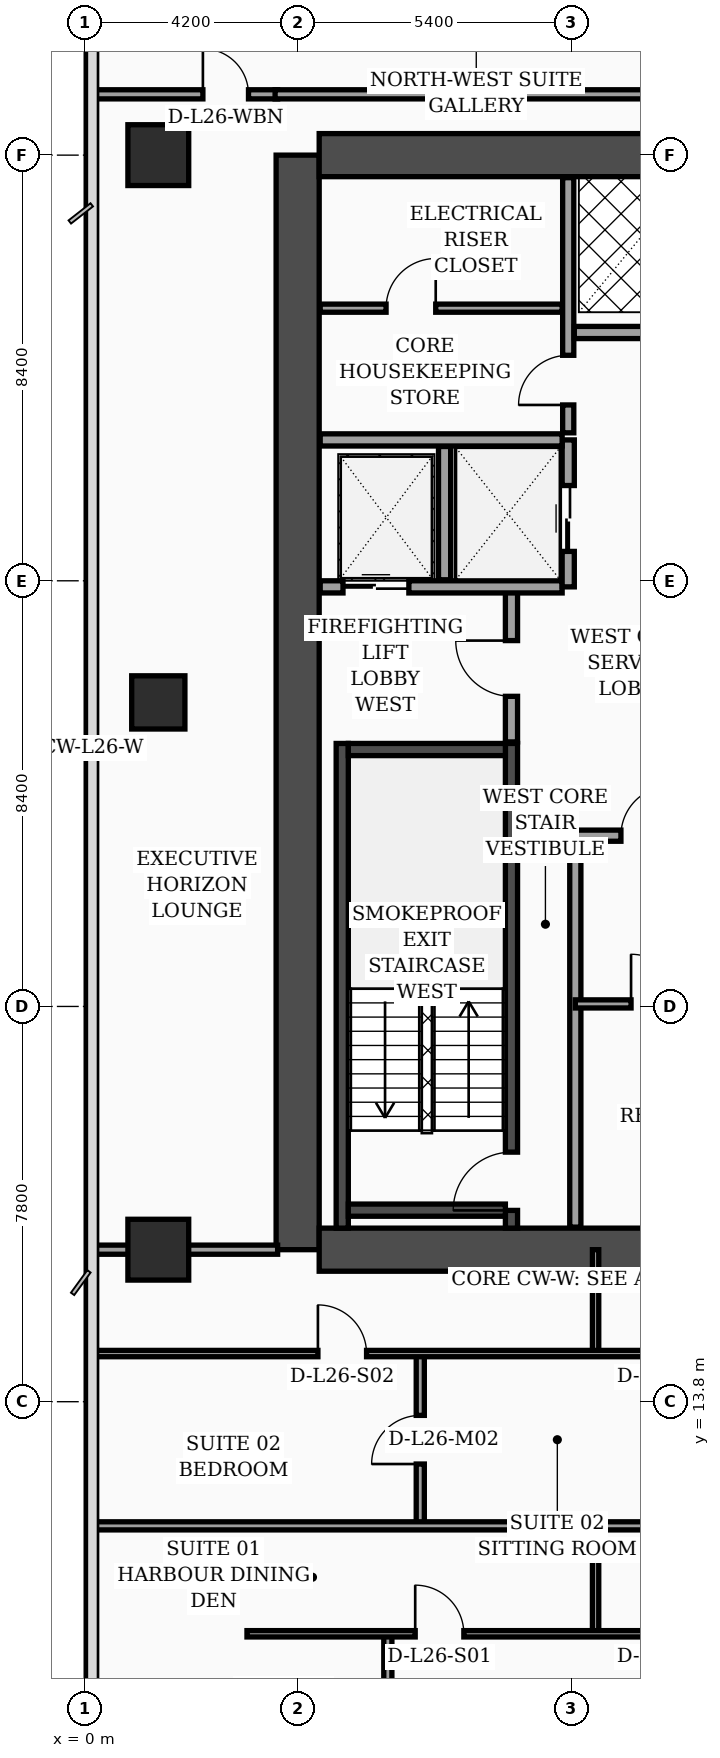
"""IFC4 building model, lengths in metres.
Left out: names, types, materials, properties, quantities, classifications, styles, units other than length and angle.
Written with IfcOpenShell. Run it as: python <this file> out.ifc"""

import sys

from ifc_helpers import new_model, si_unit, direction, frame, frame_2d, origin, origin_2d, place, context, subcontext, project, spatial, rectangle, extrude, element, fill, save


model = new_model("IFC4")
c1 = context("Model", 3, precision=1e-05, world=origin(), true_north=direction((0.0, 1.0)))
c2 = subcontext(c1, "Body", "Model", "MODEL_VIEW")
j1 = project(units=[si_unit("LENGTHUNIT", "METRE"), si_unit("PLANEANGLEUNIT", "RADIAN")], contexts=[c1])
p1 = place(None, origin())
s1 = spatial("IfcSite", under=j1, at=p1, CompositionType="ELEMENT")
p2 = place(p1, origin())
s2 = spatial("IfcBuilding", under=s1, at=p2, CompositionType="ELEMENT")
p3 = place(p2, frame((0.0, 0.0, 108.8)))
s3 = spatial("IfcBuildingStorey", under=s2, at=p3, CompositionType="ELEMENT", Elevation=108.8)
p4 = place(p3, frame((4.2, 16.8, 0.0), z_axis=(0.0, 0.0, 1.0), x_axis=(0.0, 1.0, 0.0)))
e1 = element("IfcWall", 1, at=p4, inside=s3, PredefinedType="SHEAR", context=c2, shape_type="SweptSolid", body=[
    extrude(rectangle(XDim=21.6, YDim=0.85, at=frame_2d((10.8, 0.0))), origin(), (0.0, 0.0, 1.0), 3.56),
])
for number, where, z_axis, x_axis in (
    (2, (4.625, 38.4, 0.0), (0.0, 0.0, 1.0), (1.0, 0.0, 0.0)),
    (3, (4.625, 16.8, 0.0), (0.0, 0.0, 1.0), (1.0, 0.0, 0.0)),
):
    element("IfcWall", number, at=place(p3, frame(where, z_axis=z_axis, x_axis=x_axis)), inside=s3, PredefinedType="SHEAR", context=c2, shape_type="SweptSolid", body=[
        extrude(rectangle(XDim=9.95, YDim=0.85, at=frame_2d((4.975, 0.0))), origin(), (0.0, 0.0, 1.0), 3.56),
    ])
p5 = place(p3, frame((5.08, 17.225, 0.0), z_axis=(0.0, 0.0, 1.0), x_axis=(0.0, 1.0, 0.0)))
e4 = element("IfcWall", 4, at=p5, inside=s3, PredefinedType="SOLIDWALL", context=c2, shape_type="SweptSolid", body=[
    extrude(rectangle(XDim=9.565, YDim=0.24, at=frame_2d((4.782, 0.0))), origin(), (0.0, 0.0, 1.0), 3.56),
])
p6 = place(p3, frame((8.42, 17.225, 0.0), z_axis=(0.0, 0.0, 1.0), x_axis=(0.0, 1.0, 0.0)))
e5 = element("IfcWall", 5, at=p6, inside=s3, PredefinedType="SOLIDWALL", context=c2, shape_type="SweptSolid", body=[
    extrude(rectangle(XDim=9.565, YDim=0.24, at=frame_2d((4.782, 0.0))), origin(), (0.0, 0.0, 1.0), 3.56),
])
p7 = place(p6, frame((0.35, 0.0, 0.0)))
e6 = element("IfcOpeningElement", 6, at=p7, cuts=e5, PredefinedType="OPENING", context=c2, shape_type="SweptSolid", body=[
    extrude(rectangle(XDim=1.15, YDim=2.2, at=frame_2d((0.575, 1.1))), frame((0.0, 0.13, 0.0), z_axis=(0.0, -1.0, 0.0), x_axis=(1.0, 0.0, 0.0)), (0.0, 0.0, 1.0), 0.26),
])
for number, where, z_axis, x_axis in (
    (7, (5.2, 17.58, 0.0), (0.0, 0.0, 1.0), (1.0, 0.0, 0.0)),
    (8, (5.2, 26.67, 0.0), (0.0, 0.0, 1.0), (1.0, 0.0, 0.0)),
):
    element("IfcWall", number, at=place(p3, frame(where, z_axis=z_axis, x_axis=x_axis)), inside=s3, PredefinedType="SOLIDWALL", context=c2, shape_type="SweptSolid", body=[
        extrude(rectangle(XDim=3.1, YDim=0.24, at=frame_2d((1.55, 0.0))), origin(), (0.0, 0.0, 1.0), 3.56),
    ])
p8 = place(p3, frame((1.45, 16.8, 0.0), z_axis=(0.0, 0.0, 1.0), x_axis=(1.0, 0.0, 0.0)))
e9 = element("IfcColumn", 9, at=p8, inside=s3, PredefinedType="COLUMN", context=c2, shape_type="SweptSolid", body=[
    extrude(rectangle(XDim=1.2, YDim=1.2, at=origin_2d()), origin(), (0.0, 0.0, 1.0), 3.56),
])
p9 = place(p3, frame((1.45, 27.6, 0.0), z_axis=(0.0, 0.0, 1.0), x_axis=(1.0, 0.0, 0.0)))
e10 = element("IfcColumn", 10, at=p9, inside=s3, PredefinedType="COLUMN", context=c2, shape_type="SweptSolid", body=[
    extrude(rectangle(XDim=1.05, YDim=1.05, at=origin_2d()), origin(), (0.0, 0.0, 1.0), 3.56),
])
p10 = place(p3, frame((1.45, 38.4, 0.0), z_axis=(0.0, 0.0, 1.0), x_axis=(1.0, 0.0, 0.0)))
e11 = element("IfcColumn", 11, at=p10, inside=s3, PredefinedType="COLUMN", context=c2, shape_type="SweptSolid", body=[
    extrude(rectangle(XDim=1.2, YDim=1.2, at=origin_2d()), origin(), (0.0, 0.0, 1.0), 3.56),
])
p11 = place(p3, frame((8.42, 26.82, 0.0), z_axis=(0.0, 0.0, 1.0), x_axis=(0.0, 1.0, 0.0)))
e12 = element("IfcWall", 12, at=p11, inside=s3, PredefinedType="SOLIDWALL", context=c2, shape_type="SweptSolid", body=[
    extrude(rectangle(XDim=3.0, YDim=0.24, at=frame_2d((1.5, 0.0))), origin(), (0.0, 0.0, 1.0), 3.56),
])
p12 = place(p11, frame((0.9, 0.0, 0.0)))
e13 = element("IfcOpeningElement", 13, at=p12, cuts=e12, PredefinedType="OPENING", context=c2, shape_type="SweptSolid", body=[
    extrude(rectangle(XDim=1.1, YDim=2.2, at=frame_2d((0.55, 1.1))), frame((0.0, 0.13, 0.0), z_axis=(0.0, -1.0, 0.0), x_axis=(1.0, 0.0, 0.0)), (0.0, 0.0, 1.0), 0.26),
])
p13 = place(p3, frame((4.645, 29.88, 0.0), z_axis=(0.0, 0.0, 1.0), x_axis=(1.0, 0.0, 0.0)))
e14 = element("IfcWall", 14, at=p13, inside=s3, PredefinedType="SOLIDWALL", context=c2, shape_type="SweptSolid", body=[
    extrude(rectangle(XDim=4.775, YDim=0.24, at=frame_2d((2.387, 0.0))), origin(), (0.0, 0.0, 1.0), 3.56),
])
p14 = place(p13, frame((0.45, 0.0, 0.0)))
e15 = element("IfcOpeningElement", 15, at=p14, cuts=e14, PredefinedType="OPENING", context=c2, shape_type="SweptSolid", body=[
    extrude(rectangle(XDim=1.3, YDim=2.35, at=frame_2d((0.65, 1.175))), frame((0.0, 0.13, 0.0), z_axis=(0.0, -1.0, 0.0), x_axis=(1.0, 0.0, 0.0)), (0.0, 0.0, 1.0), 0.26),
])
p15 = place(p3, frame((7.1, 30.02, 0.0), z_axis=(0.0, 0.0, 1.0), x_axis=(0.0, 1.0, 0.0)))
e16 = element("IfcWall", 16, at=p15, inside=s3, PredefinedType="SOLIDWALL", context=c2, shape_type="SweptSolid", body=[
    extrude(rectangle(XDim=2.63, YDim=0.24, at=frame_2d((1.315, 0.0))), origin(), (0.0, 0.0, 1.0), 3.56),
])
p16 = place(p3, frame((9.54, 29.88, 0.0), z_axis=(0.0, 0.0, 1.0), x_axis=(0.0, 1.0, 0.0)))
e17 = element("IfcWall", 17, at=p16, inside=s3, PredefinedType="SOLIDWALL", context=c2, shape_type="SweptSolid", body=[
    extrude(rectangle(XDim=2.9, YDim=0.24, at=frame_2d((1.45, 0.0))), origin(), (0.0, 0.0, 1.0), 3.56),
])
p17 = place(p16, frame((0.7, 0.0, 0.0)))
e18 = element("IfcOpeningElement", 18, at=p17, cuts=e17, PredefinedType="OPENING", context=c2, shape_type="SweptSolid", body=[
    extrude(rectangle(XDim=1.3, YDim=2.35, at=frame_2d((0.65, 1.175))), frame((0.0, 0.13, 0.0), z_axis=(0.0, -1.0, 0.0), x_axis=(1.0, 0.0, 0.0)), (0.0, 0.0, 1.0), 0.26),
])
p18 = place(p3, frame((4.645, 32.78, 0.0), z_axis=(0.0, 0.0, 1.0), x_axis=(1.0, 0.0, 0.0)))
e19 = element("IfcWall", 19, at=p18, inside=s3, PredefinedType="SOLIDWALL", context=c2, shape_type="SweptSolid", body=[
    extrude(rectangle(XDim=4.775, YDim=0.24, at=frame_2d((2.387, 0.0))), origin(), (0.0, 0.0, 1.0), 3.19),
])
p19 = place(p3, frame((9.68, 17.245, 0.0), z_axis=(0.0, 0.0, 1.0), x_axis=(0.0, 1.0, 0.0)))
e20 = element("IfcWall", 20, at=p19, inside=s3, PredefinedType="SOLIDWALL", context=c2, shape_type="SweptSolid", body=[
    extrude(rectangle(XDim=7.755, YDim=0.22, at=frame_2d((3.877, 0.0))), origin(), (0.0, 0.0, 1.0), 3.56),
])
p20 = place(p3, frame((4.645, 35.38, 0.0), z_axis=(0.0, 0.0, 1.0), x_axis=(1.0, 0.0, 0.0)))
e21 = element("IfcWall", 21, at=p20, inside=s3, PredefinedType="PARTITIONING", context=c2, shape_type="SweptSolid", body=[
    extrude(rectangle(XDim=4.775, YDim=0.16, at=frame_2d((2.387, 0.0))), origin(), (0.0, 0.0, 1.0), 3.56),
])
p21 = place(p20, frame((1.3, 0.0, 0.0)))
e22 = element("IfcOpeningElement", 22, at=p21, cuts=e21, PredefinedType="OPENING", context=c2, shape_type="SweptSolid", body=[
    extrude(rectangle(XDim=0.98, YDim=2.15, at=frame_2d((0.49, 1.075))), frame((0.0, 0.09, 0.0), z_axis=(0.0, -1.0, 0.0), x_axis=(1.0, 0.0, 0.0)), (0.0, 0.0, 1.0), 0.18),
])
p22 = place(p3, frame((9.54, 32.92, 0.0), z_axis=(0.0, 0.0, 1.0), x_axis=(0.0, 1.0, 0.0)))
e23 = element("IfcWall", 23, at=p22, inside=s3, PredefinedType="SOLIDWALL", context=c2, shape_type="SweptSolid", body=[
    extrude(rectangle(XDim=5.035, YDim=0.22, at=frame_2d((2.518, 0.0))), origin(), (0.0, 0.0, 1.0), 3.56),
])
p23 = place(p22, frame((0.55, 0.0, 0.0)))
e24 = element("IfcOpeningElement", 24, at=p23, cuts=e23, PredefinedType="OPENING", context=c2, shape_type="SweptSolid", body=[
    extrude(rectangle(XDim=0.98, YDim=2.15, at=frame_2d((0.49, 1.075))), frame((0.0, 0.12, 0.0), z_axis=(0.0, -1.0, 0.0), x_axis=(1.0, 0.0, 0.0)), (0.0, 0.0, 1.0), 0.24),
])
p24 = place(p3, frame((9.68, 21.65, 0.0), z_axis=(0.0, 0.0, 1.0), x_axis=(1.0, 0.0, 0.0)))
e25 = element("IfcWall", 25, at=p24, inside=s3, PredefinedType="PARTITIONING", context=c2, shape_type="SweptSolid", body=[
    extrude(rectangle(XDim=4.875, YDim=0.16, at=frame_2d((2.438, 0.0))), origin(), (0.0, 0.0, 1.0), 3.09),
])
p25 = place(p24, frame((1.1, 0.0, 0.0)))
e26 = element("IfcOpeningElement", 26, at=p25, cuts=e25, PredefinedType="OPENING", context=c2, shape_type="SweptSolid", body=[
    extrude(rectangle(XDim=0.98, YDim=2.15, at=frame_2d((0.49, 1.075))), frame((0.0, 0.09, 0.0), z_axis=(0.0, -1.0, 0.0), x_axis=(1.0, 0.0, 0.0)), (0.0, 0.0, 1.0), 0.18),
])
p26 = place(p3, frame((9.68, 24.97, 0.0), z_axis=(0.0, 0.0, 1.0), x_axis=(1.0, 0.0, 0.0)))
e27 = element("IfcWall", 27, at=p26, inside=s3, PredefinedType="SOLIDWALL", context=c2, shape_type="SweptSolid", body=[
    extrude(rectangle(XDim=4.875, YDim=0.22, at=frame_2d((2.438, 0.0))), origin(), (0.0, 0.0, 1.0), 2.84),
])
p27 = place(p26, frame((0.9, 0.0, 0.0)))
e28 = element("IfcOpeningElement", 28, at=p27, cuts=e27, PredefinedType="OPENING", context=c2, shape_type="SweptSolid", body=[
    extrude(rectangle(XDim=0.98, YDim=2.15, at=frame_2d((0.49, 1.075))), frame((0.0, 0.12, 0.0), z_axis=(0.0, -1.0, 0.0), x_axis=(1.0, 0.0, 0.0)), (0.0, 0.0, 1.0), 0.24),
])
p28 = place(p3, frame((9.66, 34.9, 0.0), z_axis=(0.0, 0.0, 1.0), x_axis=(1.0, 0.0, 0.0)))
e29 = element("IfcWall", 29, at=p28, inside=s3, PredefinedType="SOLIDWALL", context=c2, shape_type="SweptSolid", body=[
    extrude(rectangle(XDim=4.895, YDim=0.24, at=frame_2d((2.448, 0.0))), origin(), (0.0, 0.0, 1.0), 3.56),
])
p29 = place(p3, frame((0.08, 16.8, 0.0), z_axis=(0.0, 0.0, 1.0), x_axis=(1.0, 0.0, 0.0)))
e30 = element("IfcWall", 30, at=p29, inside=s3, PredefinedType="PARTITIONING", context=c2, shape_type="SweptSolid", body=[
    extrude(rectangle(XDim=3.725, YDim=0.18, at=frame_2d((1.862, 0.0))), origin(), (0.0, 0.0, 1.0), 2.84),
])
p30 = place(p3, frame((0.08, 39.6, 0.0), z_axis=(0.0, 0.0, 1.0), x_axis=(1.0, 0.0, 0.0)))
e31 = element("IfcWall", 31, at=p30, inside=s3, PredefinedType="PARTITIONING", context=c2, shape_type="SweptSolid", body=[
    extrude(rectangle(XDim=3.725, YDim=0.18, at=frame_2d((1.862, 0.0))), origin(), (0.0, 0.0, 1.0), 2.84),
])
p31 = place(p30, frame((2.25, 0.0, 0.0)))
e32 = element("IfcOpeningElement", 32, at=p31, cuts=e31, PredefinedType="OPENING", context=c2, shape_type="SweptSolid", body=[
    extrude(rectangle(XDim=0.9, YDim=2.15, at=frame_2d((0.45, 1.075))), frame((0.0, 0.1, 0.0), z_axis=(0.0, -1.0, 0.0), x_axis=(1.0, 0.0, 0.0)), (0.0, 0.0, 1.0), 0.2),
])
p32 = place(p3, frame((10.08, 9.22, 0.0), z_axis=(0.0, 0.0, 1.0), x_axis=(0.0, 1.0, 0.0)))
e33 = element("IfcWall", 33, at=p32, inside=s3, PredefinedType="PARTITIONING", context=c2, shape_type="SweptSolid", body=[
    extrude(rectangle(XDim=2.13, YDim=0.125, at=frame_2d((1.065, 0.0))), origin(), (0.0, 0.0, 1.0), 3.09),
])
p33 = place(p3, frame((5.98, 2.44, 0.0), z_axis=(0.0, 0.0, 1.0), x_axis=(0.0, 1.0, 0.0)))
e34 = element("IfcWall", 34, at=p33, inside=s3, PredefinedType="PARTITIONING", context=c2, shape_type="SweptSolid", body=[
    extrude(rectangle(XDim=6.78, YDim=0.16, at=frame_2d((3.39, 0.0))), origin(), (0.0, 0.0, 1.0), 3.04),
])
p34 = place(p33, frame((2.91, 0.0, 0.0)))
e35 = element("IfcOpeningElement", 35, at=p34, cuts=e34, PredefinedType="OPENING", context=c2, shape_type="SweptSolid", body=[
    extrude(rectangle(XDim=0.96, YDim=2.2, at=frame_2d((0.48, 1.1))), frame((0.0, 0.09, 0.0), z_axis=(0.0, -1.0, 0.0), x_axis=(1.0, 0.0, 0.0)), (0.0, 0.0, 1.0), 0.18),
])
p35 = place(p3, frame((3.2, 9.22, 0.0), z_axis=(0.0, 0.0, 1.0), x_axis=(1.0, 0.0, 0.0)))
e36 = element("IfcWall", 36, at=p35, inside=s3, PredefinedType="PARTITIONING", context=c2, shape_type="SweptSolid", body=[
    extrude(rectangle(XDim=9.8, YDim=0.125, at=frame_2d((4.9, 0.0))), origin(), (0.0, 0.0, 1.0), 2.84),
])
p36 = place(p35, frame((3.32, 0.0, 0.0)))
e37 = element("IfcOpeningElement", 37, at=p36, cuts=e36, PredefinedType="OPENING", context=c2, shape_type="SweptSolid", body=[
    extrude(rectangle(XDim=0.96, YDim=2.2, at=frame_2d((0.48, 1.1))), frame((0.0, 0.073, 0.0), z_axis=(0.0, -1.0, 0.0), x_axis=(1.0, 0.0, 0.0)), (0.0, 0.0, 1.0), 0.145),
])
p37 = place(p35, frame((7.89, 0.0, 0.0)))
e38 = element("IfcOpeningElement", 38, at=p37, cuts=e36, PredefinedType="OPENING", context=c2, shape_type="SweptSolid", body=[
    extrude(rectangle(XDim=0.9, YDim=2.15, at=frame_2d((0.45, 1.075))), frame((0.0, 0.073, 0.0), z_axis=(0.0, -1.0, 0.0), x_axis=(1.0, 0.0, 0.0)), (0.0, 0.0, 1.0), 0.145),
])
p38 = place(p3, frame((10.08, 14.75, 0.0), z_axis=(0.0, 0.0, 1.0), x_axis=(0.0, 1.0, 0.0)))
e39 = element("IfcWall", 39, at=p38, inside=s3, PredefinedType="PARTITIONING", context=c2, shape_type="SweptSolid", body=[
    extrude(rectangle(XDim=2.05, YDim=0.125, at=frame_2d((1.025, 0.0))), origin(), (0.0, 0.0, 1.0), 3.56),
])
p39 = place(p3, frame((6.62, 11.35, 0.0), z_axis=(0.0, 0.0, 1.0), x_axis=(0.0, 1.0, 0.0)))
e40 = element("IfcWall", 40, at=p39, inside=s3, PredefinedType="PARTITIONING", context=c2, shape_type="SweptSolid", body=[
    extrude(rectangle(XDim=3.4, YDim=0.16, at=frame_2d((1.7, 0.0))), origin(), (0.0, 0.0, 1.0), 3.56),
])
p40 = place(p39, frame((1.22, 0.0, 0.0)))
e41 = element("IfcOpeningElement", 41, at=p40, cuts=e40, PredefinedType="OPENING", context=c2, shape_type="SweptSolid", body=[
    extrude(rectangle(XDim=0.96, YDim=2.2, at=frame_2d((0.48, 1.1))), frame((0.0, 0.09, 0.0), z_axis=(0.0, -1.0, 0.0), x_axis=(1.0, 0.0, 0.0)), (0.0, 0.0, 1.0), 0.18),
])
p41 = place(p3, frame((0.08, 14.75, 0.0), z_axis=(0.0, 0.0, 1.0), x_axis=(1.0, 0.0, 0.0)))
e42 = element("IfcWall", 42, at=p41, inside=s3, PredefinedType="PARTITIONING", context=c2, shape_type="SweptSolid", body=[
    extrude(rectangle(XDim=12.92, YDim=0.125, at=frame_2d((6.46, 0.0))), origin(), (0.0, 0.0, 1.0), 2.84),
])
p42 = place(p41, frame((4.52, 0.0, 0.0)))
e43 = element("IfcOpeningElement", 43, at=p42, cuts=e42, PredefinedType="OPENING", context=c2, shape_type="SweptSolid", body=[
    extrude(rectangle(XDim=0.96, YDim=2.2, at=frame_2d((0.48, 1.1))), frame((0.0, 0.073, 0.0), z_axis=(0.0, -1.0, 0.0), x_axis=(1.0, 0.0, 0.0)), (0.0, 0.0, 1.0), 0.145),
])
p43 = place(p41, frame((11.01, 0.0, 0.0)))
e44 = element("IfcOpeningElement", 44, at=p43, cuts=e42, PredefinedType="OPENING", context=c2, shape_type="SweptSolid", body=[
    extrude(rectangle(XDim=0.9, YDim=2.15, at=frame_2d((0.45, 1.075))), frame((0.0, 0.073, 0.0), z_axis=(0.0, -1.0, 0.0), x_axis=(1.0, 0.0, 0.0)), (0.0, 0.0, 1.0), 0.145),
])
p44 = place(p3, frame((0.08, 11.35, 0.0), z_axis=(0.0, 0.0, 1.0), x_axis=(1.0, 0.0, 0.0)))
e45 = element("IfcWall", 45, at=p44, inside=s3, PredefinedType="PARTITIONING", context=c2, shape_type="SweptSolid", body=[
    extrude(rectangle(XDim=12.92, YDim=0.16, at=frame_2d((6.46, 0.0))), origin(), (0.0, 0.0, 1.0), 2.84),
])
p45 = place(p3, frame((3.755, 39.6, 0.0), z_axis=(0.0, 0.0, 1.0), x_axis=(1.0, 0.0, 0.0)))
e46 = element("IfcWall", 46, at=p45, inside=s3, PredefinedType="PARTITIONING", context=c2, shape_type="SweptSolid", body=[
    extrude(rectangle(XDim=11.395, YDim=0.18, at=frame_2d((5.698, 0.0))), origin(), (0.0, 0.0, 1.0), 2.84),
])
p46 = place(p12, origin())
e47 = element("IfcDoor", 47, at=p46, inside=s3, OperationType="SINGLE_SWING_RIGHT", PredefinedType="DOOR", context=c2, shape_type="SweptSolid", body=[
    extrude(rectangle(XDim=1.1, YDim=2.2, at=frame_2d((0.55, 1.1))), frame((0.0, 0.025, 0.0), z_axis=(0.0, -1.0, 0.0), x_axis=(1.0, 0.0, 0.0)), (0.0, 0.0, 1.0), 0.05),
])
fill(e13, e47)
p47 = place(p14, origin())
e48 = element("IfcDoor", 48, at=p47, inside=s3, OperationType="DOUBLE_DOOR_SLIDING", PredefinedType="DOOR", context=c2, shape_type="SweptSolid", body=[
    extrude(rectangle(XDim=1.3, YDim=2.35, at=frame_2d((0.65, 1.175))), frame((0.0, 0.025, 0.0), z_axis=(0.0, -1.0, 0.0), x_axis=(1.0, 0.0, 0.0)), (0.0, 0.0, 1.0), 0.05),
])
fill(e15, e48)
p48 = place(p17, origin())
e49 = element("IfcDoor", 49, at=p48, inside=s3, OperationType="DOUBLE_DOOR_SLIDING", PredefinedType="DOOR", context=c2, shape_type="SweptSolid", body=[
    extrude(rectangle(XDim=1.3, YDim=2.35, at=frame_2d((0.65, 1.175))), frame((0.0, 0.025, 0.0), z_axis=(0.0, -1.0, 0.0), x_axis=(1.0, 0.0, 0.0)), (0.0, 0.0, 1.0), 0.05),
])
fill(e18, e49)
p49 = place(p21, origin())
e50 = element("IfcDoor", 50, at=p49, inside=s3, OperationType="SINGLE_SWING_RIGHT", PredefinedType="DOOR", context=c2, shape_type="SweptSolid", body=[
    extrude(rectangle(XDim=0.98, YDim=2.15, at=frame_2d((0.49, 1.075))), frame((0.0, 0.025, 0.0), z_axis=(0.0, -1.0, 0.0), x_axis=(1.0, 0.0, 0.0)), (0.0, 0.0, 1.0), 0.05),
])
fill(e22, e50)
p50 = place(p23, origin())
e51 = element("IfcDoor", 51, at=p50, inside=s3, OperationType="SINGLE_SWING_LEFT", PredefinedType="DOOR", context=c2, shape_type="SweptSolid", body=[
    extrude(rectangle(XDim=0.98, YDim=2.15, at=frame_2d((0.49, 1.075))), frame((0.0, 0.025, 0.0), z_axis=(0.0, -1.0, 0.0), x_axis=(1.0, 0.0, 0.0)), (0.0, 0.0, 1.0), 0.05),
])
fill(e24, e51)
p51 = place(p25, origin())
e52 = element("IfcDoor", 52, at=p51, inside=s3, OperationType="SINGLE_SWING_LEFT", PredefinedType="DOOR", context=c2, shape_type="SweptSolid", body=[
    extrude(rectangle(XDim=0.98, YDim=2.15, at=frame_2d((0.49, 1.075))), frame((0.0, 0.025, 0.0), z_axis=(0.0, -1.0, 0.0), x_axis=(1.0, 0.0, 0.0)), (0.0, 0.0, 1.0), 0.05),
])
fill(e26, e52)
p52 = place(p27, origin())
e53 = element("IfcDoor", 53, at=p52, inside=s3, OperationType="SINGLE_SWING_RIGHT", PredefinedType="DOOR", context=c2, shape_type="SweptSolid", body=[
    extrude(rectangle(XDim=0.98, YDim=2.15, at=frame_2d((0.49, 1.075))), frame((0.0, 0.025, 0.0), z_axis=(0.0, -1.0, 0.0), x_axis=(1.0, 0.0, 0.0)), (0.0, 0.0, 1.0), 0.05),
])
fill(e28, e53)
p53 = place(p31, origin())
e54 = element("IfcDoor", 54, at=p53, inside=s3, OperationType="SINGLE_SWING_LEFT", PredefinedType="DOOR", context=c2, shape_type="SweptSolid", body=[
    extrude(rectangle(XDim=0.9, YDim=2.15, at=frame_2d((0.45, 1.075))), frame((0.0, 0.025, 0.0), z_axis=(0.0, -1.0, 0.0), x_axis=(1.0, 0.0, 0.0)), (0.0, 0.0, 1.0), 0.05),
])
fill(e32, e54)
p54 = place(p36, origin())
e55 = element("IfcDoor", 55, at=p54, inside=s3, OperationType="SINGLE_SWING_LEFT", PredefinedType="DOOR", context=c2, shape_type="SweptSolid", body=[
    extrude(rectangle(XDim=0.96, YDim=2.2, at=frame_2d((0.48, 1.1))), frame((0.0, 0.025, 0.0), z_axis=(0.0, -1.0, 0.0), x_axis=(1.0, 0.0, 0.0)), (0.0, 0.0, 1.0), 0.05),
])
fill(e37, e55)
p55 = place(p40, origin())
e56 = element("IfcDoor", 56, at=p55, inside=s3, OperationType="SINGLE_SWING_LEFT", PredefinedType="DOOR", context=c2, shape_type="SweptSolid", body=[
    extrude(rectangle(XDim=0.96, YDim=2.2, at=frame_2d((0.48, 1.1))), frame((0.0, 0.025, 0.0), z_axis=(0.0, -1.0, 0.0), x_axis=(1.0, 0.0, 0.0)), (0.0, 0.0, 1.0), 0.05),
])
fill(e41, e56)
p56 = place(p42, origin())
e57 = element("IfcDoor", 57, at=p56, inside=s3, OperationType="SINGLE_SWING_LEFT", PredefinedType="DOOR", context=c2, shape_type="SweptSolid", body=[
    extrude(rectangle(XDim=0.96, YDim=2.2, at=frame_2d((0.48, 1.1))), frame((0.0, 0.025, 0.0), z_axis=(0.0, -1.0, 0.0), x_axis=(1.0, 0.0, 0.0)), (0.0, 0.0, 1.0), 0.05),
])
fill(e43, e57)
p57 = place(p7, origin())
e58 = element("IfcDoor", 58, at=p57, inside=s3, OperationType="SINGLE_SWING_LEFT", PredefinedType="DOOR", context=c2, shape_type="SweptSolid", body=[
    extrude(rectangle(XDim=1.15, YDim=2.2, at=frame_2d((0.575, 1.1))), frame((0.0, 0.025, 0.0), z_axis=(0.0, -1.0, 0.0), x_axis=(1.0, 0.0, 0.0)), (0.0, 0.0, 1.0), 0.05),
])
fill(e6, e58)
save(model, sys.argv[1])
